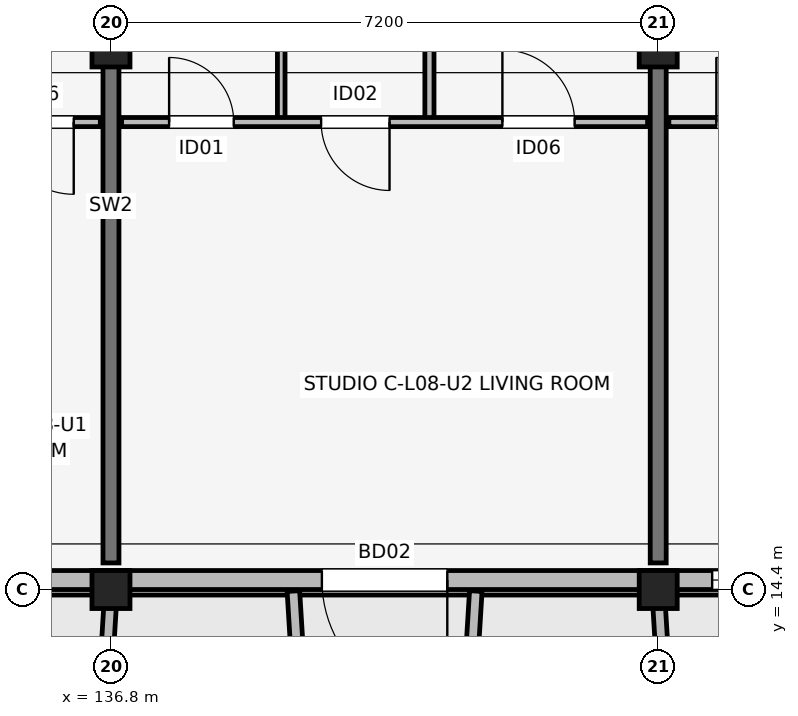
"""IFC4 building model, lengths in metres.
Left out: names, types, materials, properties, quantities, classifications, styles, units other than length and angle.
Written with IfcOpenShell. Run it as: python <this file> out.ifc"""

import sys

from ifc_helpers import new_model, si_unit, direction, frame, frame_2d, origin, origin_2d, place, context, subcontext, project, spatial, rectangle, extrude, element, fill, save


model = new_model("IFC4")
c1 = context("Model", 3, precision=1e-05, world=origin(), true_north=direction((0.0, 1.0)))
c2 = subcontext(c1, "Body", "Model", "MODEL_VIEW")
j1 = project(units=[si_unit("LENGTHUNIT", "METRE"), si_unit("PLANEANGLEUNIT", "RADIAN")], contexts=[c1])
p1 = place(None, origin())
s1 = spatial("IfcSite", under=j1, at=p1, CompositionType="ELEMENT")
p2 = place(p1, origin())
s2 = spatial("IfcBuilding", under=s1, at=p2, CompositionType="ELEMENT")
p3 = place(p2, frame((0.0, 0.0, 27.6)))
s3 = spatial("IfcBuildingStorey", under=s2, at=p3, CompositionType="ELEMENT", Elevation=27.6)
p4 = place(p3, frame((136.8, 14.4, 0.0), z_axis=(0.0, 0.0, 1.0), x_axis=(1.0, 0.0, 0.0)))
e1 = element("IfcColumn", 1, at=p4, inside=s3, PredefinedType="COLUMN", context=c2, shape_type="SweptSolid", body=[
    extrude(rectangle(XDim=0.5, YDim=0.5, at=origin_2d()), origin(), (0.0, 0.0, 1.0), 3.15),
])
p5 = place(p3, frame((136.8, 21.6, 0.0), z_axis=(0.0, 0.0, 1.0), x_axis=(1.0, 0.0, 0.0)))
e2 = element("IfcColumn", 2, at=p5, inside=s3, PredefinedType="COLUMN", context=c2, shape_type="SweptSolid", body=[
    extrude(rectangle(XDim=0.5, YDim=0.65, at=origin_2d()), origin(), (0.0, 0.0, 1.0), 3.15),
])
p6 = place(p3, frame((144.0, 14.4, 0.0), z_axis=(0.0, 0.0, 1.0), x_axis=(1.0, 0.0, 0.0)))
e3 = element("IfcColumn", 3, at=p6, inside=s3, PredefinedType="COLUMN", context=c2, shape_type="SweptSolid", body=[
    extrude(rectangle(XDim=0.5, YDim=0.5, at=origin_2d()), origin(), (0.0, 0.0, 1.0), 3.15),
])
p7 = place(p3, frame((144.0, 21.6, 0.0), z_axis=(0.0, 0.0, 1.0), x_axis=(1.0, 0.0, 0.0)))
e4 = element("IfcColumn", 4, at=p7, inside=s3, PredefinedType="COLUMN", context=c2, shape_type="SweptSolid", body=[
    extrude(rectangle(XDim=0.5, YDim=0.65, at=origin_2d()), origin(), (0.0, 0.0, 1.0), 3.15),
])
for number, where, z_axis, x_axis in (
    (5, (136.8, 14.75, 0.0), (0.0, 0.0, 1.0), (0.0, 1.0, 0.0)),
    (6, (144.0, 14.75, 0.0), (0.0, 0.0, 1.0), (0.0, 1.0, 0.0)),
):
    element("IfcWall", number, at=place(p3, frame(where, z_axis=z_axis, x_axis=x_axis)), inside=s3, PredefinedType="SHEAR", context=c2, shape_type="SweptSolid", body=[
        extrude(rectangle(XDim=9.4, YDim=0.21, at=frame_2d((4.7, 0.0))), origin(), (0.0, 0.0, 1.0), 3.15),
    ])
p8 = place(p3, frame((132.6, 14.525, 0.0), z_axis=(0.0, 0.0, 1.0), x_axis=(1.0, 0.0, 0.0)))
e7 = element("IfcWall", 7, at=p8, inside=s3, PredefinedType="SOLIDWALL", context=c2, shape_type="SweptSolid", body=[
    extrude(rectangle(XDim=30.0, YDim=0.25, at=frame_2d((15.0, 0.0))), origin(), (0.0, 0.0, 1.0), 2.43),
])
p9 = place(p8, frame((8.625, 0.0, 0.0), z_axis=(0.0, 0.0, 1.0), x_axis=(-1.0, 0.0, 0.0)))
e8 = element("IfcOpeningElement", 8, at=p9, cuts=e7, PredefinedType="OPENING", context=c2, shape_type="SweptSolid", body=[
    extrude(rectangle(XDim=1.65, YDim=2.15, at=frame_2d((0.825, 1.075))), frame((0.0, 0.135, 0.0), z_axis=(0.0, -1.0, 0.0), x_axis=(1.0, 0.0, 0.0)), (0.0, 0.0, 1.0), 0.27),
])
p10 = place(p8, frame((22.95, 0.0, 0.0), z_axis=(0.0, 0.0, 1.0), x_axis=(-1.0, 0.0, 0.0)))
e9 = element("IfcOpeningElement", 9, at=p10, cuts=e7, PredefinedType="OPENING", context=c2, shape_type="SweptSolid", body=[
    extrude(rectangle(XDim=1.5, YDim=2.15, at=frame_2d((0.75, 1.075))), frame((0.0, 0.135, 0.0), z_axis=(0.0, -1.0, 0.0), x_axis=(1.0, 0.0, 0.0)), (0.0, 0.0, 1.0), 0.27),
])
p11 = place(p8, frame((2.365, 0.0, 0.75)))
e10 = element("IfcOpeningElement", 10, at=p11, cuts=e7, PredefinedType="OPENING", context=c2, shape_type="SweptSolid", body=[
    extrude(rectangle(XDim=0.98, YDim=1.45, at=frame_2d((0.49, 0.725))), frame((0.0, 0.135, 0.0), z_axis=(0.0, -1.0, 0.0), x_axis=(1.0, 0.0, 0.0)), (0.0, 0.0, 1.0), 0.27),
])
p12 = place(p8, frame((12.11, 0.0, 0.75)))
e11 = element("IfcOpeningElement", 11, at=p12, cuts=e7, PredefinedType="OPENING", context=c2, shape_type="SweptSolid", body=[
    extrude(rectangle(XDim=1.1, YDim=1.5, at=frame_2d((0.55, 0.75))), frame((0.0, 0.135, 0.0), z_axis=(0.0, -1.0, 0.0), x_axis=(1.0, 0.0, 0.0)), (0.0, 0.0, 1.0), 0.27),
])
p13 = place(p8, frame((13.925, 0.0, 0.67)))
e12 = element("IfcOpeningElement", 12, at=p13, cuts=e7, PredefinedType="OPENING", context=c2, shape_type="SweptSolid", body=[
    extrude(rectangle(XDim=2.15, YDim=1.65, at=frame_2d((1.075, 0.825))), frame((0.0, 0.135, 0.0), z_axis=(0.0, -1.0, 0.0), x_axis=(1.0, 0.0, 0.0)), (0.0, 0.0, 1.0), 0.27),
])
p14 = place(p8, frame((26.355, 0.0, 0.7)))
e13 = element("IfcOpeningElement", 13, at=p14, cuts=e7, PredefinedType="OPENING", context=c2, shape_type="SweptSolid", body=[
    extrude(rectangle(XDim=1.58, YDim=1.6, at=frame_2d((0.79, 0.8))), frame((0.0, 0.135, 0.0), z_axis=(0.0, -1.0, 0.0), x_axis=(1.0, 0.0, 0.0)), (0.0, 0.0, 1.0), 0.27),
])
p15 = place(p3, frame((136.8, 14.38, 0.0), z_axis=(0.0, 0.0, 1.0), x_axis=(-0.061170732449, -0.998127317276, 0.0)))
e14 = element("IfcWall", 14, at=p15, inside=s3, PredefinedType="ELEMENTEDWALL", context=c2, shape_type="SweptSolid", body=[
    extrude(rectangle(XDim=1.964, YDim=0.165, at=frame_2d((0.982, 0.0))), origin(), (0.0, 0.0, 1.0), 2.95),
])
for number, where, z_axis, x_axis in (
    (15, (139.2, 14.38, 0.0), (0.0, 0.0, 1.0), (0.061, -0.998, 0.0)),
    (16, (141.6, 14.38, 0.0), (0.0, 0.0, 1.0), (-0.061, -0.998, 0.0)),
):
    element("IfcWall", number, at=place(p3, frame(where, z_axis=z_axis, x_axis=x_axis)), inside=s3, PredefinedType="ELEMENTEDWALL", context=c2, shape_type="SweptSolid", body=[
        extrude(rectangle(XDim=1.964, YDim=0.165, at=frame_2d((0.982, 0.0))), origin(), (0.0, 0.0, 1.0), 2.53),
    ])
p16 = place(p3, frame((144.0, 14.38, 0.0), z_axis=(0.0, 0.0, 1.0), x_axis=(0.061170732449, -0.998127317276, 0.0)))
e17 = element("IfcWall", 17, at=p16, inside=s3, PredefinedType="ELEMENTEDWALL", context=c2, shape_type="SweptSolid", body=[
    extrude(rectangle(XDim=1.964, YDim=0.165, at=frame_2d((0.982, 0.0))), origin(), (0.0, 0.0, 1.0), 2.95),
])
p17 = place(p3, frame((129.74, 20.55, 0.0), z_axis=(0.0, 0.0, 1.0), x_axis=(1.0, 0.0, 0.0)))
e18 = element("IfcWall", 18, at=p17, inside=s3, PredefinedType="PARTITIONING", context=c2, shape_type="SweptSolid", body=[
    extrude(rectangle(XDim=6.92, YDim=0.12, at=frame_2d((3.46, 0.0))), origin(), (0.0, 0.0, 1.0), 2.38),
])
p18 = place(p17, frame((3.09, 0.0, 0.0), z_axis=(0.0, 0.0, 1.0), x_axis=(-1.0, 0.0, 0.0)))
e19 = element("IfcOpeningElement", 19, at=p18, cuts=e18, PredefinedType="OPENING", context=c2, shape_type="SweptSolid", body=[
    extrude(rectangle(XDim=0.85, YDim=2.08, at=frame_2d((0.425, 1.04))), frame((0.0, 0.07, 0.0), z_axis=(0.0, -1.0, 0.0), x_axis=(1.0, 0.0, 0.0)), (0.0, 0.0, 1.0), 0.14),
])
p19 = place(p17, frame((3.995, 0.0, 0.0)))
e20 = element("IfcOpeningElement", 20, at=p19, cuts=e18, PredefinedType="OPENING", context=c2, shape_type="SweptSolid", body=[
    extrude(rectangle(XDim=0.9, YDim=2.08, at=frame_2d((0.45, 1.04))), frame((0.0, 0.07, 0.0), z_axis=(0.0, -1.0, 0.0), x_axis=(1.0, 0.0, 0.0)), (0.0, 0.0, 1.0), 0.14),
])
p20 = place(p17, frame((6.57, 0.0, 0.0), z_axis=(0.0, 0.0, 1.0), x_axis=(-1.0, 0.0, 0.0)))
e21 = element("IfcOpeningElement", 21, at=p20, cuts=e18, PredefinedType="OPENING", context=c2, shape_type="SweptSolid", body=[
    extrude(rectangle(XDim=0.95, YDim=2.08, at=frame_2d((0.475, 1.04))), frame((0.0, 0.07, 0.0), z_axis=(0.0, -1.0, 0.0), x_axis=(1.0, 0.0, 0.0)), (0.0, 0.0, 1.0), 0.14),
])
p21 = place(p3, frame((139.04, 20.55, 0.0), z_axis=(0.0, 0.0, 1.0), x_axis=(0.0, 1.0, 0.0)))
e22 = element("IfcWall", 22, at=p21, inside=s3, PredefinedType="PARTITIONING", context=c2, shape_type="SweptSolid", body=[
    extrude(rectangle(XDim=3.75, YDim=0.1, at=frame_2d((1.875, 0.0))), origin(), (0.0, 0.0, 1.0), 2.38),
])
p22 = place(p3, frame((140.99, 20.55, 0.0), z_axis=(0.0, 0.0, 1.0), x_axis=(0.0, 1.0, 0.0)))
e23 = element("IfcWall", 23, at=p22, inside=s3, PredefinedType="PARTITIONING", context=c2, shape_type="SweptSolid", body=[
    extrude(rectangle(XDim=3.75, YDim=0.12, at=frame_2d((1.875, 0.0))), origin(), (0.0, 0.0, 1.0), 2.38),
])
p23 = place(p3, frame((136.94, 20.55, 0.0), z_axis=(0.0, 0.0, 1.0), x_axis=(1.0, 0.0, 0.0)))
e24 = element("IfcWall", 24, at=p23, inside=s3, PredefinedType="PARTITIONING", context=c2, shape_type="SweptSolid", body=[
    extrude(rectangle(XDim=6.92, YDim=0.12, at=frame_2d((3.46, 0.0))), origin(), (0.0, 0.0, 1.0), 2.38),
])
p24 = place(p23, frame((0.625, 0.0, 0.0)))
e25 = element("IfcOpeningElement", 25, at=p24, cuts=e24, PredefinedType="OPENING", context=c2, shape_type="SweptSolid", body=[
    extrude(rectangle(XDim=0.85, YDim=2.08, at=frame_2d((0.425, 1.04))), frame((0.0, 0.07, 0.0), z_axis=(0.0, -1.0, 0.0), x_axis=(1.0, 0.0, 0.0)), (0.0, 0.0, 1.0), 0.14),
])
p25 = place(p23, frame((3.525, 0.0, 0.0), z_axis=(0.0, 0.0, 1.0), x_axis=(-1.0, 0.0, 0.0)))
e26 = element("IfcOpeningElement", 26, at=p25, cuts=e24, PredefinedType="OPENING", context=c2, shape_type="SweptSolid", body=[
    extrude(rectangle(XDim=0.9, YDim=2.08, at=frame_2d((0.45, 1.04))), frame((0.0, 0.07, 0.0), z_axis=(0.0, -1.0, 0.0), x_axis=(1.0, 0.0, 0.0)), (0.0, 0.0, 1.0), 0.14),
])
p26 = place(p23, frame((5.01, 0.0, 0.0)))
e27 = element("IfcOpeningElement", 27, at=p26, cuts=e24, PredefinedType="OPENING", context=c2, shape_type="SweptSolid", body=[
    extrude(rectangle(XDim=0.95, YDim=2.08, at=frame_2d((0.475, 1.04))), frame((0.0, 0.07, 0.0), z_axis=(0.0, -1.0, 0.0), x_axis=(1.0, 0.0, 0.0)), (0.0, 0.0, 1.0), 0.14),
])
p27 = place(p3, frame((144.14, 20.55, 0.0), z_axis=(0.0, 0.0, 1.0), x_axis=(1.0, 0.0, 0.0)))
e28 = element("IfcWall", 28, at=p27, inside=s3, PredefinedType="PARTITIONING", context=c2, shape_type="SweptSolid", body=[
    extrude(rectangle(XDim=6.92, YDim=0.12, at=frame_2d((3.46, 0.0))), origin(), (0.0, 0.0, 1.0), 2.38),
])
p28 = place(p27, frame((0.625, 0.0, 0.0)))
e29 = element("IfcOpeningElement", 29, at=p28, cuts=e28, PredefinedType="OPENING", context=c2, shape_type="SweptSolid", body=[
    extrude(rectangle(XDim=0.85, YDim=2.08, at=frame_2d((0.425, 1.04))), frame((0.0, 0.07, 0.0), z_axis=(0.0, -1.0, 0.0), x_axis=(1.0, 0.0, 0.0)), (0.0, 0.0, 1.0), 0.14),
])
p29 = place(p27, frame((3.675, 0.0, 0.0), z_axis=(0.0, 0.0, 1.0), x_axis=(-1.0, 0.0, 0.0)))
e30 = element("IfcOpeningElement", 30, at=p29, cuts=e28, PredefinedType="OPENING", context=c2, shape_type="SweptSolid", body=[
    extrude(rectangle(XDim=0.9, YDim=2.08, at=frame_2d((0.45, 1.04))), frame((0.0, 0.07, 0.0), z_axis=(0.0, -1.0, 0.0), x_axis=(1.0, 0.0, 0.0)), (0.0, 0.0, 1.0), 0.14),
])
p30 = place(p27, frame((5.16, 0.0, 0.0)))
e31 = element("IfcOpeningElement", 31, at=p30, cuts=e28, PredefinedType="OPENING", context=c2, shape_type="SweptSolid", body=[
    extrude(rectangle(XDim=0.95, YDim=2.08, at=frame_2d((0.475, 1.04))), frame((0.0, 0.07, 0.0), z_axis=(0.0, -1.0, 0.0), x_axis=(1.0, 0.0, 0.0)), (0.0, 0.0, 1.0), 0.14),
])
p31 = place(p9, origin())
e32 = element("IfcDoor", 32, at=p31, inside=s3, OperationType="SINGLE_SWING_RIGHT", PredefinedType="DOOR", context=c2, shape_type="SweptSolid", body=[
    extrude(rectangle(XDim=1.65, YDim=2.15, at=frame_2d((0.825, 1.075))), frame((0.0, 0.025, 0.0), z_axis=(0.0, -1.0, 0.0), x_axis=(1.0, 0.0, 0.0)), (0.0, 0.0, 1.0), 0.05),
])
fill(e8, e32)
p32 = place(p12, origin())
e33 = element("IfcWindow", 33, at=p32, inside=s3, PartitioningType="SINGLE_PANEL", PredefinedType="WINDOW", context=c2, shape_type="SweptSolid", body=[
    extrude(rectangle(XDim=1.1, YDim=1.5, at=frame_2d((0.55, 0.75))), frame((0.0, 0.03, 0.0), z_axis=(0.0, -1.0, 0.0), x_axis=(1.0, 0.0, 0.0)), (0.0, 0.0, 1.0), 0.06),
])
fill(e11, e33)
p33 = place(p20, origin())
e34 = element("IfcDoor", 34, at=p33, inside=s3, OperationType="SINGLE_SWING_RIGHT", PredefinedType="DOOR", context=c2, shape_type="SweptSolid", body=[
    extrude(rectangle(XDim=0.95, YDim=2.08, at=frame_2d((0.475, 1.04))), frame((0.0, 0.025, 0.0), z_axis=(0.0, -1.0, 0.0), x_axis=(1.0, 0.0, 0.0)), (0.0, 0.0, 1.0), 0.05),
])
fill(e21, e34)
p34 = place(p24, origin())
e35 = element("IfcDoor", 35, at=p34, inside=s3, OperationType="SINGLE_SWING_LEFT", PredefinedType="DOOR", context=c2, shape_type="SweptSolid", body=[
    extrude(rectangle(XDim=0.85, YDim=2.08, at=frame_2d((0.425, 1.04))), frame((0.0, 0.025, 0.0), z_axis=(0.0, -1.0, 0.0), x_axis=(1.0, 0.0, 0.0)), (0.0, 0.0, 1.0), 0.05),
])
fill(e25, e35)
p35 = place(p25, origin())
e36 = element("IfcDoor", 36, at=p35, inside=s3, OperationType="SINGLE_SWING_RIGHT", PredefinedType="DOOR", context=c2, shape_type="SweptSolid", body=[
    extrude(rectangle(XDim=0.9, YDim=2.08, at=frame_2d((0.45, 1.04))), frame((0.0, 0.025, 0.0), z_axis=(0.0, -1.0, 0.0), x_axis=(1.0, 0.0, 0.0)), (0.0, 0.0, 1.0), 0.05),
])
fill(e26, e36)
p36 = place(p26, origin())
e37 = element("IfcDoor", 37, at=p36, inside=s3, OperationType="SINGLE_SWING_LEFT", PredefinedType="DOOR", context=c2, shape_type="SweptSolid", body=[
    extrude(rectangle(XDim=0.95, YDim=2.08, at=frame_2d((0.475, 1.04))), frame((0.0, 0.025, 0.0), z_axis=(0.0, -1.0, 0.0), x_axis=(1.0, 0.0, 0.0)), (0.0, 0.0, 1.0), 0.05),
])
fill(e27, e37)
p37 = place(p28, origin())
e38 = element("IfcDoor", 38, at=p37, inside=s3, OperationType="SINGLE_SWING_LEFT", PredefinedType="DOOR", context=c2, shape_type="SweptSolid", body=[
    extrude(rectangle(XDim=0.85, YDim=2.08, at=frame_2d((0.425, 1.04))), frame((0.0, 0.025, 0.0), z_axis=(0.0, -1.0, 0.0), x_axis=(1.0, 0.0, 0.0)), (0.0, 0.0, 1.0), 0.05),
])
fill(e29, e38)
save(model, sys.argv[1])
